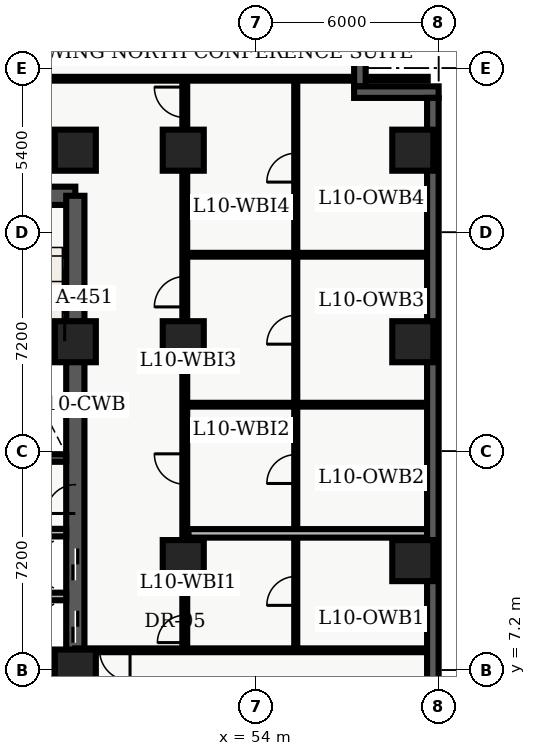
"""IFC4 building model, lengths in metres.
Left out: names, types, materials, properties, quantities, classifications, styles, units other than length and angle.
Written with IfcOpenShell. Run it as: python <this file> out.ifc"""

import sys

from ifc_helpers import new_model, entity, si_unit, converted_unit, direction, frame, origin_with_axes, origin_2d_with_axis, place, context, subcontext, project, spatial, polyline, rectangle, outline, extrude, element, fill, save


model = new_model("IFC4")
c1 = context("Model", 3, precision=1e-05, world=origin_with_axes(), true_north=direction((0.0, 1.0)))
c2 = subcontext(c1, "Body", "Model", "MODEL_VIEW")
j1 = project(units=[si_unit("LENGTHUNIT", "METRE"), converted_unit("PLANEANGLEUNIT", "DEGREE", entity("IfcPlaneAngleMeasure", 0.017), si_unit("PLANEANGLEUNIT", "RADIAN"), dimensions=[0, 0, 0, 0, 0, 0, 0])], contexts=[c1])
p1 = place(None, origin_with_axes())
s1 = spatial("IfcSite", under=j1, at=p1, CompositionType="ELEMENT")
p2 = place(p1, origin_with_axes())
s2 = spatial("IfcBuilding", under=s1, at=p2, CompositionType="ELEMENT")
p3 = place(p2, frame((0.0, 0.0, 44.4), z_axis=(0.0, 0.0, 1.0), x_axis=(1.0, 0.0, 0.0)))
s3 = spatial("IfcBuildingStorey", under=s2, at=p3, CompositionType="ELEMENT", Elevation=44.4)
p4 = place(p3, frame((40.2, 7.2, 0.0), z_axis=(0.0, 0.0, 1.0), x_axis=(1.0, 0.0, 0.0)))
e1 = element("IfcWall", 1, at=p4, inside=s3, PredefinedType="SHEAR", context=c2, shape_type="SweptSolid", body=[
    extrude(outline(polyline([(0.0, -0.3), (7.85, -0.3), (7.85, 0.3), (0.0, 0.3), (0.0, -0.3)])), origin_with_axes(), (0.0, 0.0, 1.0), 3.66),
])
p5 = place(p4, frame((2.175, 0.0, 0.0), z_axis=(0.0, 0.0, 1.0), x_axis=(1.0, 0.0, 0.0)))
e2 = element("IfcOpeningElement", 2, at=p5, cuts=e1, PredefinedType="OPENING", context=c2, shape_type="SweptSolid", body=[
    extrude(rectangle(XDim=1.05, YDim=0.62, at=origin_2d_with_axis()), origin_with_axes(), (0.0, 0.0, 1.0), 2.15),
])
p6 = place(p3, frame((40.2, 22.8, 0.0), z_axis=(0.0, 0.0, 1.0), x_axis=(1.0, 0.0, 0.0)))
e3 = element("IfcWall", 3, at=p6, inside=s3, PredefinedType="SHEAR", context=c2, shape_type="SweptSolid", body=[
    extrude(outline(polyline([(0.0, -0.3), (7.85, -0.3), (7.85, 0.3), (0.0, 0.3), (0.0, -0.3)])), origin_with_axes(), (0.0, 0.0, 1.0), 3.66),
])
p7 = place(p6, frame((5.775, 0.0, 0.0), z_axis=(0.0, 0.0, 1.0), x_axis=(1.0, 0.0, 0.0)))
e4 = element("IfcOpeningElement", 4, at=p7, cuts=e3, PredefinedType="OPENING", context=c2, shape_type="SweptSolid", body=[
    extrude(rectangle(XDim=1.05, YDim=0.62, at=origin_2d_with_axis()), origin_with_axes(), (0.0, 0.0, 1.0), 2.15),
])
p8 = place(p6, frame((2.15, 0.0, 0.0), z_axis=(0.0, 0.0, 1.0), x_axis=(1.0, 0.0, 0.0)))
e5 = element("IfcOpeningElement", 5, at=p8, cuts=e3, PredefinedType="OPENING", context=c2, shape_type="SweptSolid", body=[
    extrude(rectangle(XDim=0.9, YDim=0.62, at=origin_2d_with_axis()), origin_with_axes(), (0.0, 0.0, 1.0), 2.15),
])
p9 = place(p3, frame((48.05, 7.2, 0.0), z_axis=(0.0, 0.0, 1.0), x_axis=(0.0, 1.0, 0.0)))
e6 = element("IfcWall", 6, at=p9, inside=s3, PredefinedType="SHEAR", context=c2, shape_type="SweptSolid", body=[
    extrude(outline(polyline([(0.0, -0.3), (15.6, -0.3), (15.6, 0.3), (0.0, 0.3), (0.0, -0.3)])), origin_with_axes(), (0.0, 0.0, 1.0), 3.66),
])
p10 = place(p9, frame((1.425, 0.0, 0.0), z_axis=(0.0, 0.0, 1.0), x_axis=(1.0, 0.0, 0.0)))
e7 = element("IfcOpeningElement", 7, at=p10, cuts=e6, PredefinedType="OPENING", context=c2, shape_type="SweptSolid", body=[
    extrude(rectangle(XDim=1.05, YDim=0.62, at=origin_2d_with_axis()), origin_with_axes(), (0.0, 0.0, 1.0), 2.15),
])
p11 = place(p9, frame((3.475, 0.0, 0.0), z_axis=(0.0, 0.0, 1.0), x_axis=(1.0, 0.0, 0.0)))
e8 = element("IfcOpeningElement", 8, at=p11, cuts=e6, PredefinedType="OPENING", context=c2, shape_type="SweptSolid", body=[
    extrude(rectangle(XDim=1.05, YDim=0.62, at=origin_2d_with_axis()), origin_with_axes(), (0.0, 0.0, 1.0), 2.15),
])
p12 = place(p9, frame((5.625, 0.0, 0.0), z_axis=(0.0, 0.0, 1.0), x_axis=(1.0, 0.0, 0.0)))
e9 = element("IfcOpeningElement", 9, at=p12, cuts=e6, PredefinedType="OPENING", context=c2, shape_type="SweptSolid", body=[
    extrude(rectangle(XDim=0.95, YDim=0.62, at=origin_2d_with_axis()), origin_with_axes(), (0.0, 0.0, 1.0), 2.15),
])
p13 = place(p3, frame((44.25, 14.175, 0.0), z_axis=(0.0, 0.0, 1.0), x_axis=(1.0, 0.0, 0.0)))
e10 = element("IfcWall", 10, at=p13, inside=s3, PredefinedType="SHEAR", context=c2, shape_type="SweptSolid", body=[
    extrude(outline(polyline([(0.0, -0.125), (3.5, -0.125), (3.5, 0.125), (0.0, 0.125), (0.0, -0.125)])), origin_with_axes(), (0.0, 0.0, 1.0), 3.66),
])
for number, where, z_axis, x_axis in (
    (11, (48.05, 7.2, 0.0), (0.0, 0.0, 1.0), (1.0, 0.0, 0.0)),
    (12, (48.05, 18.0, 0.0), (0.0, 0.0, 1.0), (1.0, 0.0, 0.0)),
    (13, (48.05, 24.3, 0.0), (0.0, 0.0, 1.0), (1.0, 0.0, 0.0)),
    (14, (51.6, 10.8, 0.0), (0.0, 0.0, 1.0), (1.0, 0.0, 0.0)),
    (15, (51.6, 18.0, 0.0), (0.0, 0.0, 1.0), (1.0, 0.0, 0.0)),
    (16, (51.6, 24.3, 0.0), (0.0, 0.0, 1.0), (1.0, 0.0, 0.0)),
    (17, (59.15, 10.8, 0.0), (0.0, 0.0, 1.0), (1.0, 0.0, 0.0)),
    (18, (59.15, 18.0, 0.0), (0.0, 0.0, 1.0), (1.0, 0.0, 0.0)),
    (19, (59.15, 24.3, 0.0), (0.0, 0.0, 1.0), (1.0, 0.0, 0.0)),
):
    element("IfcColumn", number, at=place(p3, frame(where, z_axis=z_axis, x_axis=x_axis)), inside=s3, PredefinedType="COLUMN", context=c2, shape_type="SweptSolid", body=[
        extrude(rectangle(XDim=1.35, YDim=1.35, at=origin_2d_with_axis()), origin_with_axes(), (0.0, 0.0, 1.0), 3.9),
    ])
for number, where, z_axis, x_axis in (
    (20, (44.25, 9.62, 0.0), (0.0, 0.0, 1.0), (1.0, 0.0, 0.0)),
    (21, (44.25, 11.72, 0.0), (0.0, 0.0, 1.0), (1.0, 0.0, 0.0)),
):
    element("IfcWall", number, at=place(p3, frame(where, z_axis=z_axis, x_axis=x_axis)), inside=s3, PredefinedType="SOLIDWALL", context=c2, shape_type="SweptSolid", body=[
        extrude(outline(polyline([(0.0, -0.125), (3.5, -0.125), (3.5, 0.125), (0.0, 0.125), (0.0, -0.125)])), origin_with_axes(), (0.0, 0.0, 1.0), 2.7),
    ])
p14 = place(p3, frame((51.65, 7.85, 0.0), z_axis=(0.0, 0.0, 1.0), x_axis=(0.0, 1.0, 0.0)))
e22 = element("IfcWall", 22, at=p14, inside=s3, PredefinedType="PARTITIONING", context=c2, shape_type="SweptSolid", body=[
    extrude(outline(polyline([(0.0, -0.08), (18.8, -0.08), (18.8, 0.08), (0.0, 0.08), (0.0, -0.08)])), origin_with_axes(), (0.0, 0.0, 1.0), 2.7),
])
p15 = place(p14, frame((0.703, 0.0, 0.0), z_axis=(0.0, 0.0, 1.0), x_axis=(1.0, 0.0, 0.0)))
e23 = element("IfcOpeningElement", 23, at=p15, cuts=e22, PredefinedType="OPENING", context=c2, shape_type="SweptSolid", body=[
    extrude(rectangle(XDim=0.9, YDim=0.18, at=origin_2d_with_axis()), origin_with_axes(), (0.0, 0.0, 1.0), 2.15),
])
p16 = place(p14, frame((5.962, 0.0, 0.0), z_axis=(0.0, 0.0, 1.0), x_axis=(1.0, 0.0, 0.0)))
e24 = element("IfcOpeningElement", 24, at=p16, cuts=e22, PredefinedType="OPENING", context=c2, shape_type="SweptSolid", body=[
    extrude(rectangle(XDim=1.0, YDim=0.18, at=origin_2d_with_axis()), origin_with_axes(), (0.0, 0.0, 1.0), 2.15),
])
p17 = place(p14, frame((11.795, 0.0, 0.0), z_axis=(0.0, 0.0, 1.0), x_axis=(1.0, 0.0, 0.0)))
e25 = element("IfcOpeningElement", 25, at=p17, cuts=e22, PredefinedType="OPENING", context=c2, shape_type="SweptSolid", body=[
    extrude(rectangle(XDim=1.0, YDim=0.18, at=origin_2d_with_axis()), origin_with_axes(), (0.0, 0.0, 1.0), 2.15),
])
p18 = place(p14, frame((18.026, 0.0, 0.0), z_axis=(0.0, 0.0, 1.0), x_axis=(1.0, 0.0, 0.0)))
e26 = element("IfcOpeningElement", 26, at=p18, cuts=e22, PredefinedType="OPENING", context=c2, shape_type="SweptSolid", body=[
    extrude(rectangle(XDim=1.0, YDim=0.18, at=origin_2d_with_axis()), origin_with_axes(), (0.0, 0.0, 1.0), 2.15),
])
p19 = place(p3, frame((59.64, 7.85, 0.0), z_axis=(0.0, 0.0, 1.0), x_axis=(-1.0, 0.0, 0.0)))
e27 = element("IfcWall", 27, at=p19, inside=s3, PredefinedType="PARTITIONING", context=c2, shape_type="SweptSolid", body=[
    extrude(outline(polyline([(0.0, -0.062), (11.59, -0.062), (11.59, 0.062), (0.0, 0.062), (0.0, -0.062)])), origin_with_axes(), (0.0, 0.0, 1.0), 2.7),
])
p20 = place(p19, frame((10.29, 0.0, 0.0), z_axis=(0.0, 0.0, 1.0), x_axis=(1.0, 0.0, 0.0)))
e28 = element("IfcOpeningElement", 28, at=p20, cuts=e27, PredefinedType="OPENING", context=c2, shape_type="SweptSolid", body=[
    extrude(rectangle(XDim=1.0, YDim=0.145, at=origin_2d_with_axis()), origin_with_axes(), (0.0, 0.0, 1.0), 2.15),
])
p21 = place(p3, frame((38.76, 26.65, 0.0), z_axis=(0.0, 0.0, 1.0), x_axis=(1.0, 0.0, 0.0)))
e29 = element("IfcWall", 29, at=p21, inside=s3, PredefinedType="PARTITIONING", context=c2, shape_type="SweptSolid", body=[
    extrude(outline(polyline([(0.0, -0.062), (20.88, -0.062), (20.88, 0.062), (0.0, 0.062), (0.0, -0.062)])), origin_with_axes(), (0.0, 0.0, 1.0), 2.7),
])
p22 = place(p21, frame((4.24, 0.0, 0.0), z_axis=(0.0, 0.0, 1.0), x_axis=(1.0, 0.0, 0.0)))
e30 = element("IfcOpeningElement", 30, at=p22, cuts=e29, PredefinedType="OPENING", context=c2, shape_type="SweptSolid", body=[
    extrude(rectangle(XDim=1.0, YDim=0.145, at=origin_2d_with_axis()), origin_with_axes(), (0.0, 0.0, 1.0), 2.15),
])
p23 = place(p3, frame((55.3, 7.98, 0.0), z_axis=(0.0, 0.0, 1.0), x_axis=(0.0, 1.0, 0.0)))
e31 = element("IfcWall", 31, at=p23, inside=s3, PredefinedType="PARTITIONING", context=c2, shape_type="SweptSolid", body=[
    extrude(outline(polyline([(0.0, -0.05), (18.54, -0.05), (18.54, 0.05), (0.0, 0.05), (0.0, -0.05)])), origin_with_axes(), (0.0, 0.0, 1.0), 2.7),
])
p24 = place(p23, frame((1.823, 0.0, 0.0), z_axis=(0.0, 0.0, 1.0), x_axis=(1.0, 0.0, 0.0)))
e32 = element("IfcOpeningElement", 32, at=p24, cuts=e31, PredefinedType="OPENING", context=c2, shape_type="SweptSolid", body=[
    extrude(rectangle(XDim=0.95, YDim=0.12, at=origin_2d_with_axis()), origin_with_axes(), (0.0, 0.0, 1.0), 2.15),
])
p25 = place(p23, frame((5.832, 0.0, 0.0), z_axis=(0.0, 0.0, 1.0), x_axis=(1.0, 0.0, 0.0)))
e33 = element("IfcOpeningElement", 33, at=p25, cuts=e31, PredefinedType="OPENING", context=c2, shape_type="SweptSolid", body=[
    extrude(rectangle(XDim=0.95, YDim=0.12, at=origin_2d_with_axis()), origin_with_axes(), (0.0, 0.0, 1.0), 2.15),
])
p26 = place(p23, frame((10.415, 0.0, 0.0), z_axis=(0.0, 0.0, 1.0), x_axis=(1.0, 0.0, 0.0)))
e34 = element("IfcOpeningElement", 34, at=p26, cuts=e31, PredefinedType="OPENING", context=c2, shape_type="SweptSolid", body=[
    extrude(rectangle(XDim=0.95, YDim=0.12, at=origin_2d_with_axis()), origin_with_axes(), (0.0, 0.0, 1.0), 2.15),
])
p27 = place(p23, frame((15.745, 0.0, 0.0), z_axis=(0.0, 0.0, 1.0), x_axis=(1.0, 0.0, 0.0)))
e35 = element("IfcOpeningElement", 35, at=p27, cuts=e31, PredefinedType="OPENING", context=c2, shape_type="SweptSolid", body=[
    extrude(rectangle(XDim=0.95, YDim=0.12, at=origin_2d_with_axis()), origin_with_axes(), (0.0, 0.0, 1.0), 2.15),
])
p28 = place(p3, frame((51.77, 11.696, 0.0), z_axis=(0.0, 0.0, 1.0), x_axis=(1.0, 0.0, 0.0)))
e36 = element("IfcWall", 36, at=p28, inside=s3, PredefinedType="PARTITIONING", context=c2, shape_type="SweptSolid", body=[
    extrude(outline(polyline([(0.0, -0.14), (7.855, -0.14), (7.855, 0.14), (0.0, 0.14), (0.0, -0.14)])), origin_with_axes(), (0.0, 0.0, 1.0), 2.7),
])
for number, where, z_axis, x_axis in (
    (37, (51.77, 15.928, 0.0), (0.0, 0.0, 1.0), (1.0, 0.0, 0.0)),
    (38, (51.77, 20.861, 0.0), (0.0, 0.0, 1.0), (1.0, 0.0, 0.0)),
):
    element("IfcWall", number, at=place(p3, frame(where, z_axis=z_axis, x_axis=x_axis)), inside=s3, PredefinedType="PARTITIONING", context=c2, shape_type="SweptSolid", body=[
        extrude(outline(polyline([(0.0, -0.062), (7.855, -0.062), (7.855, 0.062), (0.0, 0.062), (0.0, -0.062)])), origin_with_axes(), (0.0, 0.0, 1.0), 2.7),
    ])
p29 = place(p3, frame((57.41, 28.42, 0.0), z_axis=(0.0, 0.0, 1.0), x_axis=(0.0, -1.0, 0.0)))
e39 = element("IfcWall", 39, at=p29, inside=s3, PredefinedType="SOLIDWALL", context=c2, shape_type="SweptSolid", body=[
    extrude(outline(polyline([(0.0, -0.19), (2.02, -0.19), (2.02, 0.19), (0.0, 0.19), (0.0, -0.19)])), origin_with_axes(), (0.0, 0.0, 1.0), 3.66),
])
p30 = place(p3, frame((57.22, 26.21, 0.0), z_axis=(0.0, 0.0, 1.0), x_axis=(1.0, 0.0, 0.0)))
e40 = element("IfcWall", 40, at=p30, inside=s3, PredefinedType="SOLIDWALL", context=c2, shape_type="SweptSolid", body=[
    extrude(outline(polyline([(0.0, -0.19), (2.78, -0.19), (2.78, 0.19), (0.0, 0.19), (0.0, -0.19)])), origin_with_axes(), (0.0, 0.0, 1.0), 3.66),
])
p31 = place(p3, frame((59.81, 26.02, 0.0), z_axis=(0.0, 0.0, 1.0), x_axis=(0.0, -1.0, 0.0)))
e41 = element("IfcWall", 41, at=p31, inside=s3, PredefinedType="SOLIDWALL", context=c2, shape_type="SweptSolid", body=[
    extrude(outline(polyline([(0.0, -0.19), (23.62, -0.19), (23.62, 0.19), (0.0, 0.19), (0.0, -0.19)])), origin_with_axes(), (0.0, 0.0, 1.0), 3.66),
])
p32 = place(p31, frame((20.218, 0.0, 0.45), z_axis=(0.0, 0.0, 1.0), x_axis=(1.0, 0.0, 0.0)))
e42 = element("IfcOpeningElement", 42, at=p32, cuts=e41, PredefinedType="OPENING", context=c2, shape_type="SweptSolid", body=[
    extrude(rectangle(XDim=2.1, YDim=0.4, at=origin_2d_with_axis()), origin_with_axes(), (0.0, 0.0, 1.0), 2.2),
])
p33 = place(p9, frame((1.425, 0.0, 0.0), z_axis=(0.0, 0.0, 1.0), x_axis=(1.0, 0.0, 0.0)))
e43 = element("IfcDoor", 43, at=p33, inside=s3, OperationType="SLIDING_TO_LEFT", PredefinedType="DOOR", context=c2, shape_type="SweptSolid", body=[
    extrude(rectangle(XDim=1.05, YDim=0.09, at=origin_2d_with_axis()), origin_with_axes(), (0.0, 0.0, 1.0), 2.15),
])
fill(e7, e43)
p34 = place(p9, frame((3.475, 0.0, 0.0), z_axis=(0.0, 0.0, 1.0), x_axis=(1.0, 0.0, 0.0)))
e44 = element("IfcDoor", 44, at=p34, inside=s3, OperationType="SLIDING_TO_RIGHT", PredefinedType="DOOR", context=c2, shape_type="SweptSolid", body=[
    extrude(rectangle(XDim=1.05, YDim=0.09, at=origin_2d_with_axis()), origin_with_axes(), (0.0, 0.0, 1.0), 2.15),
])
fill(e8, e44)
p35 = place(p9, frame((5.625, 0.0, 0.0), z_axis=(0.0, 0.0, 1.0), x_axis=(1.0, 0.0, 0.0)))
e45 = element("IfcDoor", 45, at=p35, inside=s3, OperationType="SINGLE_SWING_LEFT", PredefinedType="DOOR", context=c2, shape_type="SweptSolid", body=[
    extrude(rectangle(XDim=0.95, YDim=0.09, at=origin_2d_with_axis()), origin_with_axes(), (0.0, 0.0, 1.0), 2.15),
])
fill(e9, e45)
p36 = place(p19, frame((10.29, 0.0, 0.0), z_axis=(0.0, 0.0, 1.0), x_axis=(1.0, 0.0, 0.0)))
e46 = element("IfcDoor", 46, at=p36, inside=s3, OperationType="SINGLE_SWING_LEFT", PredefinedType="DOOR", context=c2, shape_type="SweptSolid", body=[
    extrude(rectangle(XDim=1.0, YDim=0.075, at=origin_2d_with_axis()), origin_with_axes(), (0.0, 0.0, 1.0), 2.15),
])
fill(e28, e46)
p37 = place(p23, frame((1.823, 0.0, 0.0), z_axis=(0.0, 0.0, 1.0), x_axis=(1.0, 0.0, 0.0)))
e47 = element("IfcDoor", 47, at=p37, inside=s3, OperationType="SINGLE_SWING_LEFT", PredefinedType="DOOR", context=c2, shape_type="SweptSolid", body=[
    extrude(rectangle(XDim=0.95, YDim=0.06, at=origin_2d_with_axis()), origin_with_axes(), (0.0, 0.0, 1.0), 2.15),
])
fill(e32, e47)
p38 = place(p14, frame((0.703, 0.0, 0.0), z_axis=(0.0, 0.0, 1.0), x_axis=(1.0, 0.0, 0.0)))
e48 = element("IfcDoor", 48, at=p38, inside=s3, OperationType="SINGLE_SWING_LEFT", PredefinedType="DOOR", context=c2, shape_type="SweptSolid", body=[
    extrude(rectangle(XDim=0.9, YDim=0.09, at=origin_2d_with_axis()), origin_with_axes(), (0.0, 0.0, 1.0), 2.15),
])
fill(e23, e48)
p39 = place(p23, frame((5.832, 0.0, 0.0), z_axis=(0.0, 0.0, 1.0), x_axis=(1.0, 0.0, 0.0)))
e49 = element("IfcDoor", 49, at=p39, inside=s3, OperationType="SINGLE_SWING_LEFT", PredefinedType="DOOR", context=c2, shape_type="SweptSolid", body=[
    extrude(rectangle(XDim=0.95, YDim=0.06, at=origin_2d_with_axis()), origin_with_axes(), (0.0, 0.0, 1.0), 2.15),
])
fill(e33, e49)
p40 = place(p14, frame((5.962, 0.0, 0.0), z_axis=(0.0, 0.0, 1.0), x_axis=(1.0, 0.0, 0.0)))
e50 = element("IfcDoor", 50, at=p40, inside=s3, OperationType="SINGLE_SWING_RIGHT", PredefinedType="DOOR", context=c2, shape_type="SweptSolid", body=[
    extrude(rectangle(XDim=1.0, YDim=0.09, at=origin_2d_with_axis()), origin_with_axes(), (0.0, 0.0, 1.0), 2.15),
])
fill(e24, e50)
p41 = place(p23, frame((10.415, 0.0, 0.0), z_axis=(0.0, 0.0, 1.0), x_axis=(1.0, 0.0, 0.0)))
e51 = element("IfcDoor", 51, at=p41, inside=s3, OperationType="SINGLE_SWING_LEFT", PredefinedType="DOOR", context=c2, shape_type="SweptSolid", body=[
    extrude(rectangle(XDim=0.95, YDim=0.06, at=origin_2d_with_axis()), origin_with_axes(), (0.0, 0.0, 1.0), 2.15),
])
fill(e34, e51)
p42 = place(p14, frame((11.795, 0.0, 0.0), z_axis=(0.0, 0.0, 1.0), x_axis=(1.0, 0.0, 0.0)))
e52 = element("IfcDoor", 52, at=p42, inside=s3, OperationType="SINGLE_SWING_LEFT", PredefinedType="DOOR", context=c2, shape_type="SweptSolid", body=[
    extrude(rectangle(XDim=1.0, YDim=0.09, at=origin_2d_with_axis()), origin_with_axes(), (0.0, 0.0, 1.0), 2.15),
])
fill(e25, e52)
p43 = place(p23, frame((15.745, 0.0, 0.0), z_axis=(0.0, 0.0, 1.0), x_axis=(1.0, 0.0, 0.0)))
e53 = element("IfcDoor", 53, at=p43, inside=s3, OperationType="SINGLE_SWING_LEFT", PredefinedType="DOOR", context=c2, shape_type="SweptSolid", body=[
    extrude(rectangle(XDim=0.95, YDim=0.06, at=origin_2d_with_axis()), origin_with_axes(), (0.0, 0.0, 1.0), 2.15),
])
fill(e35, e53)
p44 = place(p14, frame((18.026, 0.0, 0.0), z_axis=(0.0, 0.0, 1.0), x_axis=(1.0, 0.0, 0.0)))
e54 = element("IfcDoor", 54, at=p44, inside=s3, OperationType="SINGLE_SWING_RIGHT", PredefinedType="DOOR", context=c2, shape_type="SweptSolid", body=[
    extrude(rectangle(XDim=1.0, YDim=0.09, at=origin_2d_with_axis()), origin_with_axes(), (0.0, 0.0, 1.0), 2.15),
])
fill(e26, e54)
save(model, sys.argv[1])
